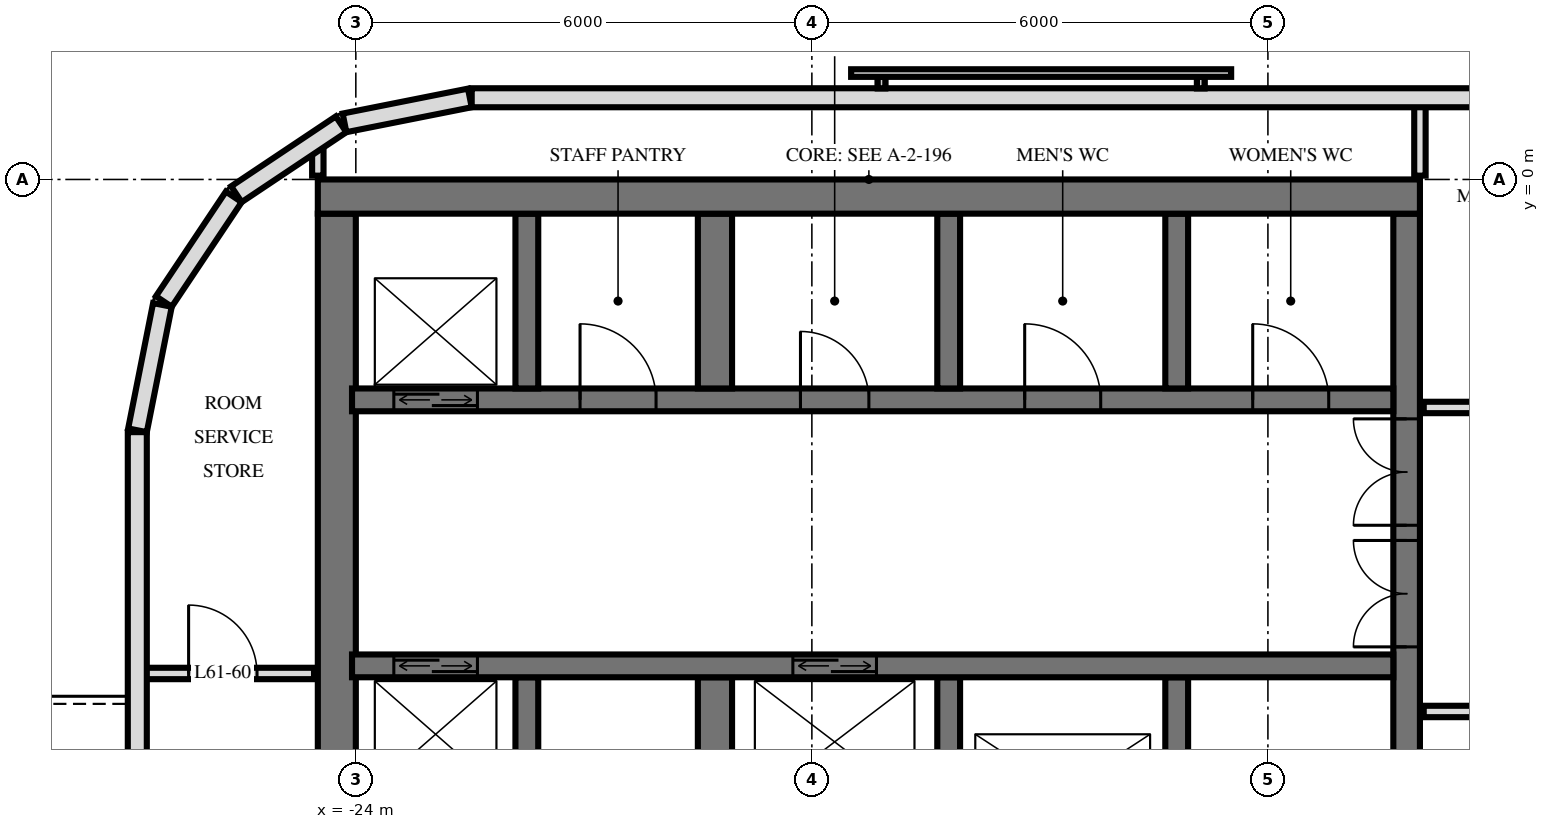
"""IFC4 building model, lengths in metres.
Left out: names, types, materials, properties, quantities, classifications, styles, units other than length and angle.
Written with IfcOpenShell. Run it as: python <this file> out.ifc"""

import sys

from ifc_helpers import new_model, si_unit, direction, frame, frame_2d, origin, place, context, subcontext, project, spatial, rectangle, extrude, element, fill, save


model = new_model("IFC4")
c1 = context("Model", 3, precision=1e-05, world=origin(), true_north=direction((0.0, 1.0)))
c2 = subcontext(c1, "Body", "Model", "MODEL_VIEW")
j1 = project(units=[si_unit("LENGTHUNIT", "METRE"), si_unit("PLANEANGLEUNIT", "RADIAN")], contexts=[c1])
p1 = place(None, origin())
s1 = spatial("IfcSite", under=j1, at=p1, CompositionType="ELEMENT")
p2 = place(p1, origin())
s2 = spatial("IfcBuilding", under=s1, at=p2, CompositionType="ELEMENT")
p3 = place(p2, frame((0.0, 0.0, 232.6)))
s3 = spatial("IfcBuildingStorey", under=s2, at=p3, CompositionType="ELEMENT", Elevation=232.6)
p4 = place(p3, frame((-24.5, -0.225, 0.0), z_axis=(0.0, 0.0, 1.0), x_axis=(1.0, 0.0, 0.0)))
e1 = element("IfcWall", 1, at=p4, inside=s3, PredefinedType="SHEAR", context=c2, shape_type="SweptSolid", body=[
    extrude(rectangle(XDim=14.5, YDim=0.45, at=frame_2d((7.25, 0.0))), origin(), (0.0, 0.0, 1.0), 3.5),
])
p5 = place(p3, frame((-10.175, -14.55, 0.0), z_axis=(0.0, 0.0, 1.0), x_axis=(0.0, 1.0, 0.0)))
e2 = element("IfcWall", 2, at=p5, inside=s3, PredefinedType="SHEAR", context=c2, shape_type="SweptSolid", body=[
    extrude(rectangle(XDim=14.1, YDim=0.35, at=frame_2d((7.05, 0.0))), origin(), (0.0, 0.0, 1.0), 3.5),
])
p6 = place(p5, frame((8.4, 0.0, 0.0)))
e3 = element("IfcOpeningElement", 3, at=p6, cuts=e2, PredefinedType="OPENING", context=c2, shape_type="SweptSolid", body=[
    extrude(rectangle(XDim=1.4, YDim=2.4, at=frame_2d((0.7, 1.2))), frame((0.0, 0.185, 0.0), z_axis=(0.0, -1.0, 0.0), x_axis=(1.0, 0.0, 0.0)), (0.0, 0.0, 1.0), 0.37),
])
p7 = place(p5, frame((10.0, 0.0, 0.0)))
e4 = element("IfcOpeningElement", 4, at=p7, cuts=e2, PredefinedType="OPENING", context=c2, shape_type="SweptSolid", body=[
    extrude(rectangle(XDim=1.4, YDim=2.4, at=frame_2d((0.7, 1.2))), frame((0.0, 0.185, 0.0), z_axis=(0.0, -1.0, 0.0), x_axis=(1.0, 0.0, 0.0)), (0.0, 0.0, 1.0), 0.37),
])
p8 = place(p5, frame((4.0, 0.0, 0.0)))
e5 = element("IfcOpeningElement", 5, at=p8, cuts=e2, PredefinedType="OPENING", context=c2, shape_type="SweptSolid", body=[
    extrude(rectangle(XDim=1.2, YDim=2.1, at=frame_2d((0.6, 1.05))), frame((0.0, 0.185, 0.0), z_axis=(0.0, -1.0, 0.0), x_axis=(1.0, 0.0, 0.0)), (0.0, 0.0, 1.0), 0.37),
])
p9 = place(p3, frame((-24.25, -14.55, 0.0), z_axis=(0.0, 0.0, 1.0), x_axis=(0.0, 1.0, 0.0)))
e6 = element("IfcWall", 6, at=p9, inside=s3, PredefinedType="SHEAR", context=c2, shape_type="SweptSolid", body=[
    extrude(rectangle(XDim=14.1, YDim=0.5, at=frame_2d((7.05, 0.0))), origin(), (0.0, 0.0, 1.0), 3.5),
])
p10 = place(p3, frame((-24.05, -2.9, 0.0), z_axis=(0.0, 0.0, 1.0), x_axis=(1.0, 0.0, 0.0)))
e7 = element("IfcWall", 7, at=p10, inside=s3, PredefinedType="SHEAR", context=c2, shape_type="SweptSolid", body=[
    extrude(rectangle(XDim=13.7, YDim=0.3, at=frame_2d((6.85, 0.0))), origin(), (0.0, 0.0, 1.0), 3.5),
])
p11 = place(p10, frame((0.55, 0.0, 0.0)))
e8 = element("IfcOpeningElement", 8, at=p11, cuts=e7, PredefinedType="OPENING", context=c2, shape_type="SweptSolid", body=[
    extrude(rectangle(XDim=1.1, YDim=2.1, at=frame_2d((0.55, 1.05))), frame((0.0, 0.16, 0.0), z_axis=(0.0, -1.0, 0.0), x_axis=(1.0, 0.0, 0.0)), (0.0, 0.0, 1.0), 0.32),
])
p12 = place(p10, frame((5.9, 0.0, 0.0)))
e9 = element("IfcOpeningElement", 9, at=p12, cuts=e7, PredefinedType="OPENING", context=c2, shape_type="SweptSolid", body=[
    extrude(rectangle(XDim=0.9, YDim=2.1, at=frame_2d((0.45, 1.05))), frame((0.0, 0.16, 0.0), z_axis=(0.0, -1.0, 0.0), x_axis=(1.0, 0.0, 0.0)), (0.0, 0.0, 1.0), 0.32),
])
p13 = place(p10, frame((11.85, 0.0, 0.0)))
e10 = element("IfcOpeningElement", 10, at=p13, cuts=e7, PredefinedType="OPENING", context=c2, shape_type="SweptSolid", body=[
    extrude(rectangle(XDim=1.0, YDim=2.1, at=frame_2d((0.5, 1.05))), frame((0.0, 0.16, 0.0), z_axis=(0.0, -1.0, 0.0), x_axis=(1.0, 0.0, 0.0)), (0.0, 0.0, 1.0), 0.32),
])
p14 = place(p10, frame((8.85, 0.0, 0.0)))
e11 = element("IfcOpeningElement", 11, at=p14, cuts=e7, PredefinedType="OPENING", context=c2, shape_type="SweptSolid", body=[
    extrude(rectangle(XDim=1.0, YDim=2.1, at=frame_2d((0.5, 1.05))), frame((0.0, 0.16, 0.0), z_axis=(0.0, -1.0, 0.0), x_axis=(1.0, 0.0, 0.0)), (0.0, 0.0, 1.0), 0.32),
])
p15 = place(p10, frame((3.0, 0.0, 0.0)))
e12 = element("IfcOpeningElement", 12, at=p15, cuts=e7, PredefinedType="OPENING", context=c2, shape_type="SweptSolid", body=[
    extrude(rectangle(XDim=1.0, YDim=2.1, at=frame_2d((0.5, 1.05))), frame((0.0, 0.16, 0.0), z_axis=(0.0, -1.0, 0.0), x_axis=(1.0, 0.0, 0.0)), (0.0, 0.0, 1.0), 0.32),
])
p16 = place(p3, frame((-24.05, -6.4, 0.0), z_axis=(0.0, 0.0, 1.0), x_axis=(1.0, 0.0, 0.0)))
e13 = element("IfcWall", 13, at=p16, inside=s3, PredefinedType="SHEAR", context=c2, shape_type="SweptSolid", body=[
    extrude(rectangle(XDim=13.7, YDim=0.3, at=frame_2d((6.85, 0.0))), origin(), (0.0, 0.0, 1.0), 3.5),
])
p17 = place(p16, frame((0.55, 0.0, 0.0)))
e14 = element("IfcOpeningElement", 14, at=p17, cuts=e13, PredefinedType="OPENING", context=c2, shape_type="SweptSolid", body=[
    extrude(rectangle(XDim=1.1, YDim=2.1, at=frame_2d((0.55, 1.05))), frame((0.0, 0.16, 0.0), z_axis=(0.0, -1.0, 0.0), x_axis=(1.0, 0.0, 0.0)), (0.0, 0.0, 1.0), 0.32),
])
p18 = place(p16, frame((5.8, 0.0, 0.0)))
e15 = element("IfcOpeningElement", 15, at=p18, cuts=e13, PredefinedType="OPENING", context=c2, shape_type="SweptSolid", body=[
    extrude(rectangle(XDim=1.1, YDim=2.1, at=frame_2d((0.55, 1.05))), frame((0.0, 0.16, 0.0), z_axis=(0.0, -1.0, 0.0), x_axis=(1.0, 0.0, 0.0)), (0.0, 0.0, 1.0), 0.32),
])
for number, where, z_axis, x_axis in (
    (16, (-13.2, -2.75, 0.0), (0.0, 0.0, 1.0), (0.0, 1.0, 0.0)),
    (17, (-13.2, -8.85, 0.0), (0.0, 0.0, 1.0), (0.0, 1.0, 0.0)),
    (18, (-16.2, -2.75, 0.0), (0.0, 0.0, 1.0), (0.0, 1.0, 0.0)),
    (19, (-16.2, -8.85, 0.0), (0.0, 0.0, 1.0), (0.0, 1.0, 0.0)),
):
    element("IfcWall", number, at=place(p3, frame(where, z_axis=z_axis, x_axis=x_axis)), inside=s3, PredefinedType="SHEAR", context=c2, shape_type="SweptSolid", body=[
        extrude(rectangle(XDim=2.3, YDim=0.3, at=frame_2d((1.15, 0.0))), origin(), (0.0, 0.0, 1.0), 3.5),
    ])
for number, where, z_axis, x_axis in (
    (20, (-19.275, -2.75, 0.0), (0.0, 0.0, 1.0), (0.0, 1.0, 0.0)),
    (21, (-19.275, -8.85, 0.0), (0.0, 0.0, 1.0), (0.0, 1.0, 0.0)),
):
    element("IfcWall", number, at=place(p3, frame(where, z_axis=z_axis, x_axis=x_axis)), inside=s3, PredefinedType="SHEAR", context=c2, shape_type="SweptSolid", body=[
        extrude(rectangle(XDim=2.3, YDim=0.45, at=frame_2d((1.15, 0.0))), origin(), (0.0, 0.0, 1.0), 3.5),
    ])
for number, where, z_axis, x_axis in (
    (22, (-21.75, -2.75, 0.0), (0.0, 0.0, 1.0), (0.0, 1.0, 0.0)),
    (23, (-21.75, -8.85, 0.0), (0.0, 0.0, 1.0), (0.0, 1.0, 0.0)),
):
    element("IfcWall", number, at=place(p3, frame(where, z_axis=z_axis, x_axis=x_axis)), inside=s3, PredefinedType="SHEAR", context=c2, shape_type="SweptSolid", body=[
        extrude(rectangle(XDim=2.3, YDim=0.3, at=frame_2d((1.15, 0.0))), origin(), (0.0, 0.0, 1.0), 3.5),
    ])
p19 = place(p3, frame((22.475, 1.075, 0.0), z_axis=(0.0, 0.0, 1.0), x_axis=(-1.0, 0.0, 0.0)))
e24 = element("IfcWall", 24, at=p19, inside=s3, PredefinedType="SOLIDWALL", context=c2, shape_type="SweptSolid", body=[
    extrude(rectangle(XDim=44.951, YDim=0.25, at=frame_2d((22.475, 0.0))), origin(), (0.0, 0.0, 1.0), 3.22),
])
p20 = place(p19, frame((15.275, 0.0, 0.9)))
e25 = element("IfcOpeningElement", 25, at=p20, cuts=e24, PredefinedType="OPENING", context=c2, shape_type="SweptSolid", body=[
    extrude(rectangle(XDim=2.4, YDim=1.5, at=frame_2d((1.2, 0.75))), frame((0.0, 0.135, 0.0), z_axis=(0.0, -1.0, 0.0), x_axis=(1.0, 0.0, 0.0)), (0.0, 0.0, 1.0), 0.27),
])
p21 = place(p19, frame((18.275, 0.0, 0.9)))
e26 = element("IfcOpeningElement", 26, at=p21, cuts=e24, PredefinedType="OPENING", context=c2, shape_type="SweptSolid", body=[
    extrude(rectangle(XDim=2.4, YDim=1.5, at=frame_2d((1.2, 0.75))), frame((0.0, 0.135, 0.0), z_axis=(0.0, -1.0, 0.0), x_axis=(1.0, 0.0, 0.0)), (0.0, 0.0, 1.0), 0.27),
])
p22 = place(p19, frame((29.275, 0.0, 0.9)))
e27 = element("IfcOpeningElement", 27, at=p22, cuts=e24, PredefinedType="OPENING", context=c2, shape_type="SweptSolid", body=[
    extrude(rectangle(XDim=2.4, YDim=1.5, at=frame_2d((1.2, 0.75))), frame((0.0, 0.135, 0.0), z_axis=(0.0, -1.0, 0.0), x_axis=(1.0, 0.0, 0.0)), (0.0, 0.0, 1.0), 0.27),
])
p23 = place(p3, frame((-22.5, 1.073, 0.0), z_axis=(0.0, 0.0, 1.0), x_axis=(-0.980803419081, -0.194999110559, 0.0)))
e28 = element("IfcWall", 28, at=p23, inside=s3, PredefinedType="SOLIDWALL", context=c2, shape_type="SweptSolid", body=[
    extrude(rectangle(XDim=1.681, YDim=0.25, at=frame_2d((0.841, 0.0))), origin(), (0.0, 0.0, 1.0), 3.22),
])
for number, where, z_axis, x_axis in (
    (29, (-24.194, 0.726, 0.0), (0.0, 0.0, 1.0), (-0.831, -0.556, 0.0)),
    (30, (-25.606, -0.229, 0.0), (0.0, 0.0, 1.0), (-0.556, -0.831, 0.0)),
):
    element("IfcWall", number, at=place(p3, frame(where, z_axis=z_axis, x_axis=x_axis)), inside=s3, PredefinedType="SOLIDWALL", context=c2, shape_type="SweptSolid", body=[
        extrude(rectangle(XDim=1.656, YDim=0.25, at=frame_2d((0.828, 0.0))), origin(), (0.0, 0.0, 1.0), 3.22),
    ])
p24 = place(p3, frame((-26.545, -1.651, 0.0), z_axis=(0.0, 0.0, 1.0), x_axis=(-0.194999110559, -0.980803419081, 0.0)))
e31 = element("IfcWall", 31, at=p24, inside=s3, PredefinedType="SOLIDWALL", context=c2, shape_type="SweptSolid", body=[
    extrude(rectangle(XDim=1.681, YDim=0.25, at=frame_2d((0.841, 0.0))), origin(), (0.0, 0.0, 1.0), 3.22),
])
p25 = place(p3, frame((-26.875, -3.325, 0.0), z_axis=(0.0, 0.0, 1.0), x_axis=(0.0, -1.0, 0.0)))
e32 = element("IfcWall", 32, at=p25, inside=s3, PredefinedType="SOLIDWALL", context=c2, shape_type="SweptSolid", body=[
    extrude(rectangle(XDim=21.551, YDim=0.25, at=frame_2d((10.775, 0.0))), origin(), (0.0, 0.0, 1.0), 3.22),
])
p26 = place(p25, frame((6.575, 0.0, 0.0)))
e33 = element("IfcOpeningElement", 33, at=p26, cuts=e32, PredefinedType="OPENING", context=c2, shape_type="SweptSolid", body=[
    extrude(rectangle(XDim=1.8, YDim=2.4, at=frame_2d((0.9, 1.2))), frame((0.0, 0.135, 0.0), z_axis=(0.0, -1.0, 0.0), x_axis=(1.0, 0.0, 0.0)), (0.0, 0.0, 1.0), 0.27),
])
p27 = place(p25, frame((9.425, 0.0, 0.9)))
e34 = element("IfcOpeningElement", 34, at=p27, cuts=e32, PredefinedType="OPENING", context=c2, shape_type="SweptSolid", body=[
    extrude(rectangle(XDim=1.8, YDim=1.5, at=frame_2d((0.9, 0.75))), frame((0.0, 0.135, 0.0), z_axis=(0.0, -1.0, 0.0), x_axis=(1.0, 0.0, 0.0)), (0.0, 0.0, 1.0), 0.27),
])
p28 = place(p25, frame((12.575, 0.0, 0.9)))
e35 = element("IfcOpeningElement", 35, at=p28, cuts=e32, PredefinedType="OPENING", context=c2, shape_type="SweptSolid", body=[
    extrude(rectangle(XDim=1.2, YDim=1.5, at=frame_2d((0.6, 0.75))), frame((0.0, 0.135, 0.0), z_axis=(0.0, -1.0, 0.0), x_axis=(1.0, 0.0, 0.0)), (0.0, 0.0, 1.0), 0.27),
])
p29 = place(p25, frame((15.275, 0.0, 0.0)))
e36 = element("IfcOpeningElement", 36, at=p29, cuts=e32, PredefinedType="OPENING", context=c2, shape_type="SweptSolid", body=[
    extrude(rectangle(XDim=1.8, YDim=2.4, at=frame_2d((0.9, 1.2))), frame((0.0, 0.135, 0.0), z_axis=(0.0, -1.0, 0.0), x_axis=(1.0, 0.0, 0.0)), (0.0, 0.0, 1.0), 0.27),
])
p30 = place(p25, frame((18.875, 0.0, 0.0)))
e37 = element("IfcOpeningElement", 37, at=p30, cuts=e32, PredefinedType="OPENING", context=c2, shape_type="SweptSolid", body=[
    extrude(rectangle(XDim=1.8, YDim=2.4, at=frame_2d((0.9, 1.2))), frame((0.0, 0.135, 0.0), z_axis=(0.0, -1.0, 0.0), x_axis=(1.0, 0.0, 0.0)), (0.0, 0.0, 1.0), 0.27),
])
p31 = place(p3, frame((-10.0, 0.05, 0.0), z_axis=(0.0, 0.0, 1.0), x_axis=(0.0, 1.0, 0.0)))
e38 = element("IfcWall", 38, at=p31, inside=s3, PredefinedType="PARTITIONING", context=c2, shape_type="SweptSolid", body=[
    extrude(rectangle(XDim=0.97, YDim=0.15, at=frame_2d((0.485, 0.0))), origin(), (0.0, 0.0, 1.0), 3.22),
])
p32 = place(p3, frame((-24.5, 0.05, 0.0), z_axis=(0.0, 0.0, 1.0), x_axis=(0.0, 1.0, 0.0)))
e39 = element("IfcWall", 39, at=p32, inside=s3, PredefinedType="PARTITIONING", context=c2, shape_type="SweptSolid", body=[
    extrude(rectangle(XDim=0.405, YDim=0.15, at=frame_2d((0.203, 0.0))), origin(), (0.0, 0.0, 1.0), 3.22),
])
p33 = place(p3, frame((-9.95, -7.0, 0.0), z_axis=(0.0, 0.0, 1.0), x_axis=(1.0, 0.0, 0.0)))
e40 = element("IfcWall", 40, at=p33, inside=s3, PredefinedType="PARTITIONING", context=c2, shape_type="SweptSolid", body=[
    extrude(rectangle(XDim=19.9, YDim=0.15, at=frame_2d((9.95, 0.0))), origin(), (0.0, 0.0, 1.0), 3.22),
])
p34 = place(p33, frame((9.45, 0.0, 0.0)))
e41 = element("IfcOpeningElement", 41, at=p34, cuts=e40, PredefinedType="OPENING", context=c2, shape_type="SweptSolid", body=[
    extrude(rectangle(XDim=1.0, YDim=2.1, at=frame_2d((0.5, 1.05))), frame((0.0, 0.085, 0.0), z_axis=(0.0, -1.0, 0.0), x_axis=(1.0, 0.0, 0.0)), (0.0, 0.0, 1.0), 0.17),
])
p35 = place(p33, frame((3.45, 0.0, 0.0)))
e42 = element("IfcOpeningElement", 42, at=p35, cuts=e40, PredefinedType="OPENING", context=c2, shape_type="SweptSolid", body=[
    extrude(rectangle(XDim=1.0, YDim=2.1, at=frame_2d((0.5, 1.05))), frame((0.0, 0.085, 0.0), z_axis=(0.0, -1.0, 0.0), x_axis=(1.0, 0.0, 0.0)), (0.0, 0.0, 1.0), 0.17),
])
p36 = place(p3, frame((-26.82, -6.5, 0.0), z_axis=(0.0, 0.0, 1.0), x_axis=(1.0, 0.0, 0.0)))
e43 = element("IfcWall", 43, at=p36, inside=s3, PredefinedType="PARTITIONING", context=c2, shape_type="SweptSolid", body=[
    extrude(rectangle(XDim=2.27, YDim=0.15, at=frame_2d((1.135, 0.0))), origin(), (0.0, 0.0, 1.0), 3.22),
])
p37 = place(p36, frame((0.62, 0.0, 0.0)))
e44 = element("IfcOpeningElement", 44, at=p37, cuts=e43, PredefinedType="OPENING", context=c2, shape_type="SweptSolid", body=[
    extrude(rectangle(XDim=0.9, YDim=2.1, at=frame_2d((0.45, 1.05))), frame((0.0, 0.085, 0.0), z_axis=(0.0, -1.0, 0.0), x_axis=(1.0, 0.0, 0.0)), (0.0, 0.0, 1.0), 0.17),
])
p38 = place(p3, frame((-9.95, -3.0, 0.0), z_axis=(0.0, 0.0, 1.0), x_axis=(1.0, 0.0, 0.0)))
e45 = element("IfcWall", 45, at=p38, inside=s3, PredefinedType="PARTITIONING", context=c2, shape_type="SweptSolid", body=[
    extrude(rectangle(XDim=19.9, YDim=0.15, at=frame_2d((9.95, 0.0))), origin(), (0.0, 0.0, 1.0), 3.22),
])
p39 = place(p38, frame((1.45, 0.0, 0.0)))
e46 = element("IfcOpeningElement", 46, at=p39, cuts=e45, PredefinedType="OPENING", context=c2, shape_type="SweptSolid", body=[
    extrude(rectangle(XDim=1.0, YDim=2.1, at=frame_2d((0.5, 1.05))), frame((0.0, 0.085, 0.0), z_axis=(0.0, -1.0, 0.0), x_axis=(1.0, 0.0, 0.0)), (0.0, 0.0, 1.0), 0.17),
])
p40 = place(p38, frame((4.95, 0.0, 0.0)))
e47 = element("IfcOpeningElement", 47, at=p40, cuts=e45, PredefinedType="OPENING", context=c2, shape_type="SweptSolid", body=[
    extrude(rectangle(XDim=1.0, YDim=2.1, at=frame_2d((0.5, 1.05))), frame((0.0, 0.085, 0.0), z_axis=(0.0, -1.0, 0.0), x_axis=(1.0, 0.0, 0.0)), (0.0, 0.0, 1.0), 0.17),
])
p41 = place(p38, frame((7.7, 0.0, 0.0)))
e48 = element("IfcOpeningElement", 48, at=p41, cuts=e45, PredefinedType="OPENING", context=c2, shape_type="SweptSolid", body=[
    extrude(rectangle(XDim=1.0, YDim=2.1, at=frame_2d((0.5, 1.05))), frame((0.0, 0.085, 0.0), z_axis=(0.0, -1.0, 0.0), x_axis=(1.0, 0.0, 0.0)), (0.0, 0.0, 1.0), 0.17),
])
p42 = place(p38, frame((14.2, 0.0, 0.0)))
e49 = element("IfcOpeningElement", 49, at=p42, cuts=e45, PredefinedType="OPENING", context=c2, shape_type="SweptSolid", body=[
    extrude(rectangle(XDim=1.0, YDim=2.1, at=frame_2d((0.5, 1.05))), frame((0.0, 0.085, 0.0), z_axis=(0.0, -1.0, 0.0), x_axis=(1.0, 0.0, 0.0)), (0.0, 0.0, 1.0), 0.17),
])
p43 = place(p11, origin())
e50 = element("IfcDoor", 50, at=p43, inside=s3, OperationType="DOUBLE_DOOR_SLIDING", PredefinedType="USERDEFINED", context=c2, shape_type="SweptSolid", body=[
    extrude(rectangle(XDim=1.1, YDim=2.1, at=frame_2d((0.55, 1.05))), frame((0.0, 0.025, 0.0), z_axis=(0.0, -1.0, 0.0), x_axis=(1.0, 0.0, 0.0)), (0.0, 0.0, 1.0), 0.05),
])
fill(e8, e50)
p44 = place(p17, origin())
e51 = element("IfcDoor", 51, at=p44, inside=s3, OperationType="DOUBLE_DOOR_SLIDING", PredefinedType="USERDEFINED", context=c2, shape_type="SweptSolid", body=[
    extrude(rectangle(XDim=1.1, YDim=2.1, at=frame_2d((0.55, 1.05))), frame((0.0, 0.025, 0.0), z_axis=(0.0, -1.0, 0.0), x_axis=(1.0, 0.0, 0.0)), (0.0, 0.0, 1.0), 0.05),
])
fill(e14, e51)
p45 = place(p18, origin())
e52 = element("IfcDoor", 52, at=p45, inside=s3, OperationType="DOUBLE_DOOR_SLIDING", PredefinedType="USERDEFINED", context=c2, shape_type="SweptSolid", body=[
    extrude(rectangle(XDim=1.1, YDim=2.1, at=frame_2d((0.55, 1.05))), frame((0.0, 0.025, 0.0), z_axis=(0.0, -1.0, 0.0), x_axis=(1.0, 0.0, 0.0)), (0.0, 0.0, 1.0), 0.05),
])
fill(e15, e52)
p46 = place(p6, origin())
e53 = element("IfcDoor", 53, at=p46, inside=s3, OperationType="DOUBLE_DOOR_SINGLE_SWING", PredefinedType="DOOR", context=c2, shape_type="SweptSolid", body=[
    extrude(rectangle(XDim=1.4, YDim=2.4, at=frame_2d((0.7, 1.2))), frame((0.0, 0.025, 0.0), z_axis=(0.0, -1.0, 0.0), x_axis=(1.0, 0.0, 0.0)), (0.0, 0.0, 1.0), 0.05),
])
fill(e3, e53)
p47 = place(p7, origin())
e54 = element("IfcDoor", 54, at=p47, inside=s3, OperationType="DOUBLE_DOOR_SINGLE_SWING", PredefinedType="DOOR", context=c2, shape_type="SweptSolid", body=[
    extrude(rectangle(XDim=1.4, YDim=2.4, at=frame_2d((0.7, 1.2))), frame((0.0, 0.025, 0.0), z_axis=(0.0, -1.0, 0.0), x_axis=(1.0, 0.0, 0.0)), (0.0, 0.0, 1.0), 0.05),
])
fill(e4, e54)
p48 = place(p12, origin())
e55 = element("IfcDoor", 55, at=p48, inside=s3, OperationType="SINGLE_SWING_RIGHT", PredefinedType="DOOR", context=c2, shape_type="SweptSolid", body=[
    extrude(rectangle(XDim=0.9, YDim=2.1, at=frame_2d((0.45, 1.05))), frame((0.0, 0.025, 0.0), z_axis=(0.0, -1.0, 0.0), x_axis=(1.0, 0.0, 0.0)), (0.0, 0.0, 1.0), 0.05),
])
fill(e9, e55)
p49 = place(p13, origin())
e56 = element("IfcDoor", 56, at=p49, inside=s3, OperationType="SINGLE_SWING_RIGHT", PredefinedType="DOOR", context=c2, shape_type="SweptSolid", body=[
    extrude(rectangle(XDim=1.0, YDim=2.1, at=frame_2d((0.5, 1.05))), frame((0.0, 0.025, 0.0), z_axis=(0.0, -1.0, 0.0), x_axis=(1.0, 0.0, 0.0)), (0.0, 0.0, 1.0), 0.05),
])
fill(e10, e56)
p50 = place(p14, origin())
e57 = element("IfcDoor", 57, at=p50, inside=s3, OperationType="SINGLE_SWING_RIGHT", PredefinedType="DOOR", context=c2, shape_type="SweptSolid", body=[
    extrude(rectangle(XDim=1.0, YDim=2.1, at=frame_2d((0.5, 1.05))), frame((0.0, 0.025, 0.0), z_axis=(0.0, -1.0, 0.0), x_axis=(1.0, 0.0, 0.0)), (0.0, 0.0, 1.0), 0.05),
])
fill(e11, e57)
p51 = place(p15, origin())
e58 = element("IfcDoor", 58, at=p51, inside=s3, OperationType="SINGLE_SWING_RIGHT", PredefinedType="DOOR", context=c2, shape_type="SweptSolid", body=[
    extrude(rectangle(XDim=1.0, YDim=2.1, at=frame_2d((0.5, 1.05))), frame((0.0, 0.025, 0.0), z_axis=(0.0, -1.0, 0.0), x_axis=(1.0, 0.0, 0.0)), (0.0, 0.0, 1.0), 0.05),
])
fill(e12, e58)
p52 = place(p37, origin())
e59 = element("IfcDoor", 59, at=p52, inside=s3, OperationType="SINGLE_SWING_RIGHT", PredefinedType="DOOR", context=c2, shape_type="SweptSolid", body=[
    extrude(rectangle(XDim=0.9, YDim=2.1, at=frame_2d((0.45, 1.05))), frame((0.0, 0.025, 0.0), z_axis=(0.0, -1.0, 0.0), x_axis=(1.0, 0.0, 0.0)), (0.0, 0.0, 1.0), 0.05),
])
fill(e44, e59)
save(model, sys.argv[1])
